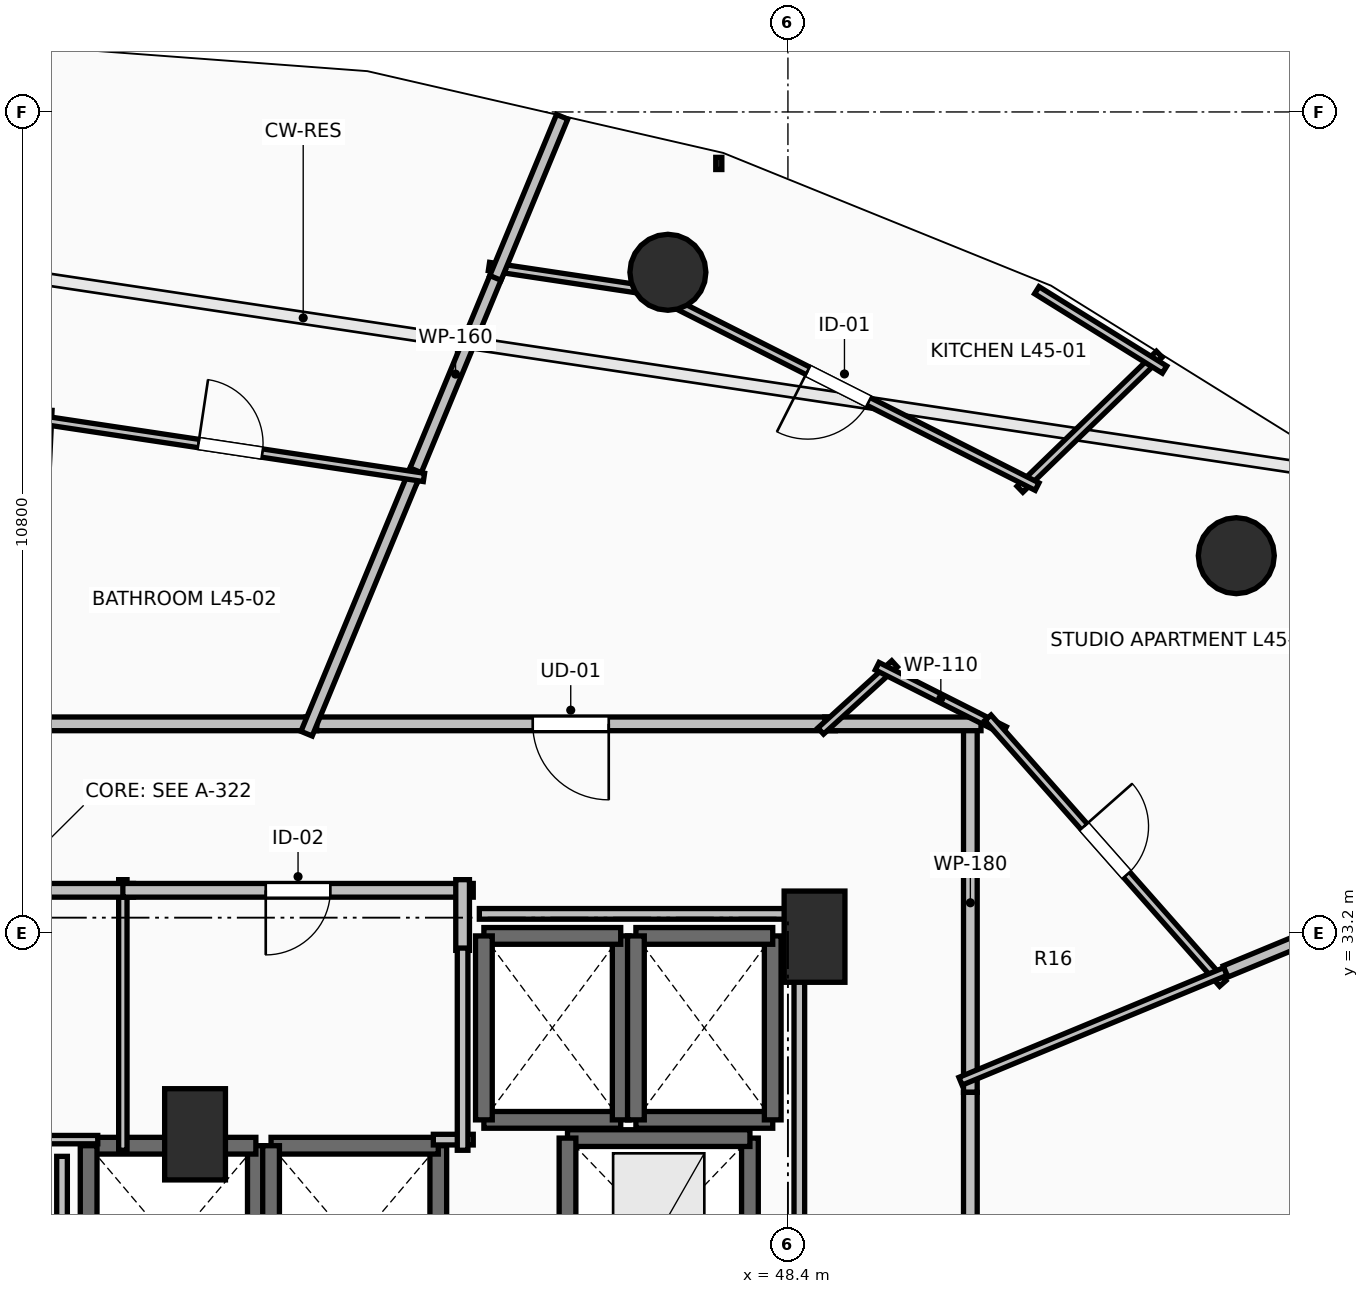
"""IFC4 building model, lengths in metres.
Left out: names, types, materials, properties, quantities, classifications, styles, units other than length and angle.
Written with IfcOpenShell. Run it as: python <this file> out.ifc"""

import sys

from ifc_helpers import new_model, si_unit, direction, frame, frame_2d, origin, origin_2d, place, context, subcontext, project, spatial, rectangle, circle, extrude, element, fill, save


model = new_model("IFC4")
c1 = context("Model", 3, precision=1e-05, world=origin(), true_north=direction((0.0, 1.0)))
c2 = subcontext(c1, "Body", "Model", "MODEL_VIEW")
j1 = project(units=[si_unit("LENGTHUNIT", "METRE"), si_unit("PLANEANGLEUNIT", "RADIAN")], contexts=[c1])
p1 = place(None, origin())
s1 = spatial("IfcSite", under=j1, at=p1, CompositionType="ELEMENT")
p2 = place(p1, origin())
s2 = spatial("IfcBuilding", under=s1, at=p2, CompositionType="ELEMENT")
p3 = place(p2, frame((0.0, 0.0, 167.6)))
s3 = spatial("IfcBuildingStorey", under=s2, at=p3, CompositionType="ELEMENT", Elevation=167.6)
for number, where, z_axis, x_axis in (
    (1, (54.299, 38.162, 0.0), (0.0, 0.0, 1.0), (0.707, 0.707, 0.0)),
    (2, (46.821, 41.891, 0.0), (0.0, 0.0, 1.0), (0.383, 0.924, 0.0)),
):
    element("IfcColumn", number, at=place(p3, frame(where, z_axis=z_axis, x_axis=x_axis)), inside=s3, PredefinedType="COLUMN", context=c2, shape_type="SweptSolid", body=[
        extrude(circle(Radius=0.5, at=origin_2d()), origin(), (0.0, 0.0, 1.0), 3.5),
    ])
for number, where, z_axis, x_axis in (
    (3, (48.75, 33.15, 0.0), (0.0, 0.0, 1.0), (1.0, 0.0, 0.0)),
    (4, (40.6, 30.55, 0.0), (0.0, 0.0, 1.0), (1.0, 0.0, 0.0)),
):
    element("IfcColumn", number, at=place(p3, frame(where, z_axis=z_axis, x_axis=x_axis)), inside=s3, PredefinedType="PILASTER", context=c2, shape_type="SweptSolid", body=[
        extrude(rectangle(XDim=0.8, YDim=1.2, at=origin_2d()), origin(), (0.0, 0.0, 1.0), 3.5),
    ])
p4 = place(p3, frame((41.4, 27.8, 0.0), z_axis=(0.0, 0.0, 1.0), x_axis=(0.0, 1.0, 0.0)))
e5 = element("IfcWall", 5, at=p4, inside=s3, PredefinedType="SOLIDWALL", context=c2, shape_type="SweptSolid", body=[
    extrude(rectangle(XDim=2.6, YDim=0.22, at=frame_2d((1.3, 0.0))), origin(), (0.0, 0.0, 1.0), 3.24),
])
p5 = place(p3, frame((41.4, 30.4, 0.0), z_axis=(0.0, 0.0, 1.0), x_axis=(-1.0, 0.0, 0.0)))
e6 = element("IfcWall", 6, at=p5, inside=s3, PredefinedType="SOLIDWALL", context=c2, shape_type="SweptSolid", body=[
    extrude(rectangle(XDim=2.2, YDim=0.22, at=frame_2d((1.1, 0.0))), origin(), (0.0, 0.0, 1.0), 3.24),
])
for number, where, z_axis, x_axis in (
    (7, (39.2, 30.4, 0.0), (0.0, 0.0, 1.0), (0.0, -1.0, 0.0)),
    (8, (43.8, 27.8, 0.0), (0.0, 0.0, 1.0), (0.0, 1.0, 0.0)),
):
    element("IfcWall", number, at=place(p3, frame(where, z_axis=z_axis, x_axis=x_axis)), inside=s3, PredefinedType="SOLIDWALL", context=c2, shape_type="SweptSolid", body=[
        extrude(rectangle(XDim=2.6, YDim=0.22, at=frame_2d((1.3, 0.0))), origin(), (0.0, 0.0, 1.0), 3.24),
    ])
p6 = place(p3, frame((43.8, 30.4, 0.0), z_axis=(0.0, 0.0, 1.0), x_axis=(-1.0, 0.0, 0.0)))
e9 = element("IfcWall", 9, at=p6, inside=s3, PredefinedType="SOLIDWALL", context=c2, shape_type="SweptSolid", body=[
    extrude(rectangle(XDim=2.2, YDim=0.22, at=frame_2d((1.1, 0.0))), origin(), (0.0, 0.0, 1.0), 3.24),
])
p7 = place(p3, frame((41.6, 30.4, 0.0), z_axis=(0.0, 0.0, 1.0), x_axis=(0.0, -1.0, 0.0)))
e10 = element("IfcWall", 10, at=p7, inside=s3, PredefinedType="SOLIDWALL", context=c2, shape_type="SweptSolid", body=[
    extrude(rectangle(XDim=2.6, YDim=0.22, at=frame_2d((1.3, 0.0))), origin(), (0.0, 0.0, 1.0), 3.24),
])
p8 = place(p3, frame((44.4, 30.74, 0.0), z_axis=(0.0, 0.0, 1.0), x_axis=(1.0, 0.0, 0.0)))
e11 = element("IfcWall", 11, at=p8, inside=s3, PredefinedType="SOLIDWALL", context=c2, shape_type="SweptSolid", body=[
    extrude(rectangle(XDim=1.8, YDim=0.22, at=frame_2d((0.9, 0.0))), origin(), (0.0, 0.0, 1.0), 3.24),
])
p9 = place(p3, frame((46.2, 30.74, 0.0), z_axis=(0.0, 0.0, 1.0), x_axis=(0.0, 1.0, 0.0)))
e12 = element("IfcWall", 12, at=p9, inside=s3, PredefinedType="SOLIDWALL", context=c2, shape_type="SweptSolid", body=[
    extrude(rectangle(XDim=2.42, YDim=0.22, at=frame_2d((1.21, 0.0))), origin(), (0.0, 0.0, 1.0), 3.24),
])
p10 = place(p3, frame((46.2, 33.16, 0.0), z_axis=(0.0, 0.0, 1.0), x_axis=(-1.0, 0.0, 0.0)))
e13 = element("IfcWall", 13, at=p10, inside=s3, PredefinedType="SOLIDWALL", context=c2, shape_type="SweptSolid", body=[
    extrude(rectangle(XDim=1.8, YDim=0.22, at=frame_2d((0.9, 0.0))), origin(), (0.0, 0.0, 1.0), 3.24),
])
p11 = place(p3, frame((44.4, 33.16, 0.0), z_axis=(0.0, 0.0, 1.0), x_axis=(0.0, -1.0, 0.0)))
e14 = element("IfcWall", 14, at=p11, inside=s3, PredefinedType="SOLIDWALL", context=c2, shape_type="SweptSolid", body=[
    extrude(rectangle(XDim=2.42, YDim=0.22, at=frame_2d((1.21, 0.0))), origin(), (0.0, 0.0, 1.0), 3.24),
])
p12 = place(p3, frame((46.4, 30.74, 0.0), z_axis=(0.0, 0.0, 1.0), x_axis=(1.0, 0.0, 0.0)))
e15 = element("IfcWall", 15, at=p12, inside=s3, PredefinedType="SOLIDWALL", context=c2, shape_type="SweptSolid", body=[
    extrude(rectangle(XDim=1.8, YDim=0.22, at=frame_2d((0.9, 0.0))), origin(), (0.0, 0.0, 1.0), 3.24),
])
p13 = place(p3, frame((48.2, 30.74, 0.0), z_axis=(0.0, 0.0, 1.0), x_axis=(0.0, 1.0, 0.0)))
e16 = element("IfcWall", 16, at=p13, inside=s3, PredefinedType="SOLIDWALL", context=c2, shape_type="SweptSolid", body=[
    extrude(rectangle(XDim=2.42, YDim=0.22, at=frame_2d((1.21, 0.0))), origin(), (0.0, 0.0, 1.0), 3.24),
])
p14 = place(p3, frame((48.2, 33.16, 0.0), z_axis=(0.0, 0.0, 1.0), x_axis=(-1.0, 0.0, 0.0)))
e17 = element("IfcWall", 17, at=p14, inside=s3, PredefinedType="SOLIDWALL", context=c2, shape_type="SweptSolid", body=[
    extrude(rectangle(XDim=1.8, YDim=0.22, at=frame_2d((0.9, 0.0))), origin(), (0.0, 0.0, 1.0), 3.24),
])
p15 = place(p3, frame((46.4, 33.16, 0.0), z_axis=(0.0, 0.0, 1.0), x_axis=(0.0, -1.0, 0.0)))
e18 = element("IfcWall", 18, at=p15, inside=s3, PredefinedType="SOLIDWALL", context=c2, shape_type="SweptSolid", body=[
    extrude(rectangle(XDim=2.42, YDim=0.22, at=frame_2d((1.21, 0.0))), origin(), (0.0, 0.0, 1.0), 3.24),
])
p16 = place(p3, frame((47.9, 28.0, 0.0), z_axis=(0.0, 0.0, 1.0), x_axis=(0.0, 1.0, 0.0)))
e19 = element("IfcWall", 19, at=p16, inside=s3, PredefinedType="SHEAR", context=c2, shape_type="SweptSolid", body=[
    extrude(rectangle(XDim=2.5, YDim=0.22, at=frame_2d((1.25, 0.0))), origin(), (0.0, 0.0, 1.0), 3.24),
])
p17 = place(p3, frame((47.9, 30.5, 0.0), z_axis=(0.0, 0.0, 1.0), x_axis=(-1.0, 0.0, 0.0)))
e20 = element("IfcWall", 20, at=p17, inside=s3, PredefinedType="SHEAR", context=c2, shape_type="SweptSolid", body=[
    extrude(rectangle(XDim=2.4, YDim=0.22, at=frame_2d((1.2, 0.0))), origin(), (0.0, 0.0, 1.0), 3.24),
])
p18 = place(p3, frame((45.5, 30.5, 0.0), z_axis=(0.0, 0.0, 1.0), x_axis=(0.0, -1.0, 0.0)))
e21 = element("IfcWall", 21, at=p18, inside=s3, PredefinedType="SHEAR", context=c2, shape_type="SweptSolid", body=[
    extrude(rectangle(XDim=2.5, YDim=0.22, at=frame_2d((1.25, 0.0))), origin(), (0.0, 0.0, 1.0), 3.24),
])
p19 = place(p3, frame((39.65, 30.34, 0.0), z_axis=(0.0, 0.0, 1.0), x_axis=(0.0, 1.0, 0.0)))
e22 = element("IfcWall", 22, at=p19, inside=s3, PredefinedType="PARTITIONING", context=c2, shape_type="SweptSolid", body=[
    extrude(rectangle(XDim=3.56, YDim=0.11, at=frame_2d((1.78, 0.0))), origin(), (0.0, 0.0, 1.0), 2.432),
])
p20 = place(p3, frame((36.16, 30.48, 0.0), z_axis=(0.0, 0.0, 1.0), x_axis=(1.0, 0.0, 0.0)))
e23 = element("IfcWall", 23, at=p20, inside=s3, PredefinedType="PARTITIONING", context=c2, shape_type="SweptSolid", body=[
    extrude(rectangle(XDim=3.16, YDim=0.11, at=frame_2d((1.58, 0.0))), origin(), (0.0, 0.0, 1.0), 2.432),
])
p21 = place(p3, frame((39.79, 33.76, 0.0), z_axis=(0.0, 0.0, 1.0), x_axis=(-1.0, 0.0, 0.0)))
e24 = element("IfcWall", 24, at=p21, inside=s3, PredefinedType="PARTITIONING", context=c2, shape_type="SweptSolid", body=[
    extrude(rectangle(XDim=3.63, YDim=0.18, at=frame_2d((1.815, 0.0))), origin(), (0.0, 0.0, 1.0), 3.24),
])
p22 = place(p21, frame((1.39, 0.0, 0.0)))
e25 = element("IfcOpeningElement", 25, at=p22, cuts=e24, PredefinedType="OPENING", context=c2, shape_type="SweptSolid", body=[
    extrude(rectangle(XDim=0.85, YDim=2.1, at=frame_2d((0.425, 1.05))), frame((0.0, 0.105, 0.0), z_axis=(0.0, -1.0, 0.0), x_axis=(1.0, 0.0, 0.0)), (0.0, 0.0, 1.0), 0.21),
])
p23 = place(p3, frame((44.26, 33.76, 0.0), z_axis=(0.0, 0.0, 1.0), x_axis=(-1.0, 0.0, 0.0)))
e26 = element("IfcWall", 26, at=p23, inside=s3, PredefinedType="PARTITIONING", context=c2, shape_type="SweptSolid", body=[
    extrude(rectangle(XDim=4.61, YDim=0.18, at=frame_2d((2.305, 0.0))), origin(), (0.0, 0.0, 1.0), 3.24),
])
p24 = place(p23, frame((1.88, 0.0, 0.0)))
e27 = element("IfcOpeningElement", 27, at=p24, cuts=e26, PredefinedType="OPENING", context=c2, shape_type="SweptSolid", body=[
    extrude(rectangle(XDim=0.85, YDim=2.1, at=frame_2d((0.425, 1.05))), frame((0.0, 0.105, 0.0), z_axis=(0.0, -1.0, 0.0), x_axis=(1.0, 0.0, 0.0)), (0.0, 0.0, 1.0), 0.21),
])
p25 = place(p3, frame((44.12, 32.97, 0.0), z_axis=(0.0, 0.0, 1.0), x_axis=(0.0, 1.0, 0.0)))
e28 = element("IfcWall", 28, at=p25, inside=s3, PredefinedType="PARTITIONING", context=c2, shape_type="SweptSolid", body=[
    extrude(rectangle(XDim=0.93, YDim=0.18, at=frame_2d((0.465, 0.0))), origin(), (0.0, 0.0, 1.0), 3.24),
])
p26 = place(p3, frame((49.024, 35.95, 0.0), z_axis=(0.0, 0.0, 1.0), x_axis=(-1.0, 0.0, 0.0)))
e29 = element("IfcWall", 29, at=p26, inside=s3, PredefinedType="PARTITIONING", context=c2, shape_type="SweptSolid", body=[
    extrude(rectangle(XDim=6.963, YDim=0.18, at=frame_2d((3.481, 0.0))), origin(), (0.0, 0.0, 1.0), 2.432),
])
p27 = place(p26, frame((2.981, 0.0, 0.0)))
e30 = element("IfcOpeningElement", 30, at=p27, cuts=e29, PredefinedType="OPENING", context=c2, shape_type="SweptSolid", body=[
    extrude(rectangle(XDim=1.0, YDim=2.15, at=frame_2d((0.5, 1.075))), frame((0.0, 0.105, 0.0), z_axis=(0.0, -1.0, 0.0), x_axis=(1.0, 0.0, 0.0)), (0.0, 0.0, 1.0), 0.21),
])
p28 = place(p3, frame((50.8, 31.102, 0.0), z_axis=(0.0, 0.0, 1.0), x_axis=(0.0, 1.0, 0.0)))
e31 = element("IfcWall", 31, at=p28, inside=s3, PredefinedType="PARTITIONING", context=c2, shape_type="SweptSolid", body=[
    extrude(rectangle(XDim=4.988, YDim=0.18, at=frame_2d((2.494, 0.0))), origin(), (0.0, 0.0, 1.0), 2.432),
])
p29 = place(p3, frame((50.94, 35.95, 0.0), z_axis=(0.0, 0.0, 1.0), x_axis=(-1.0, 0.0, 0.0)))
e32 = element("IfcWall", 32, at=p29, inside=s3, PredefinedType="PARTITIONING", context=c2, shape_type="SweptSolid", body=[
    extrude(rectangle(XDim=2.056, YDim=0.18, at=frame_2d((1.028, 0.0))), origin(), (0.0, 0.0, 1.0), 2.874),
])
p30 = place(p3, frame((42.201, 35.95, 0.0), z_axis=(0.0, 0.0, 1.0), x_axis=(-1.0, 0.0, 0.0)))
e33 = element("IfcWall", 33, at=p30, inside=s3, PredefinedType="PARTITIONING", context=c2, shape_type="SweptSolid", body=[
    extrude(rectangle(XDim=3.812, YDim=0.18, at=frame_2d((1.906, 0.0))), origin(), (0.0, 0.0, 1.0), 3.24),
])
p31 = place(p3, frame((50.8, 27.25, 0.0), z_axis=(0.0, 0.0, 1.0), x_axis=(0.0, 1.0, 0.0)))
e34 = element("IfcWall", 34, at=p31, inside=s3, PredefinedType="PARTITIONING", context=c2, shape_type="SweptSolid", body=[
    extrude(rectangle(XDim=3.852, YDim=0.18, at=frame_2d((1.926, 0.0))), origin(), (0.0, 0.0, 1.0), 2.432),
])
p32 = place(p3, frame((48.831, 35.856, 0.0), z_axis=(0.0, 0.0, 1.0), x_axis=(0.739696022243, 0.672941152463, 0.0)))
e35 = element("IfcWall", 35, at=p32, inside=s3, PredefinedType="PARTITIONING", context=c2, shape_type="SweptSolid", body=[
    extrude(rectangle(XDim=1.313, YDim=0.11, at=frame_2d((0.656, 0.0))), origin(), (0.0, 0.0, 1.0), 2.874),
])
p33 = place(p3, frame((49.574, 36.708, 0.0), z_axis=(0.0, 0.0, 1.0), x_axis=(0.8925722309, -0.450904438464, 0.0)))
e36 = element("IfcWall", 36, at=p33, inside=s3, PredefinedType="PARTITIONING", context=c2, shape_type="SweptSolid", body=[
    extrude(rectangle(XDim=1.877, YDim=0.11, at=frame_2d((0.938, 0.0))), origin(), (0.0, 0.0, 1.0), 3.24),
])
p34 = place(p3, frame((51.031, 36.03, 0.0), z_axis=(0.0, 0.0, 1.0), x_axis=(0.662223763999, -0.749306136632, 0.0)))
e37 = element("IfcWall", 37, at=p34, inside=s3, PredefinedType="PARTITIONING", context=c2, shape_type="SweptSolid", body=[
    extrude(rectangle(XDim=4.665, YDim=0.11, at=frame_2d((2.333, 0.0))), origin(), (0.0, 0.0, 1.0), 2.432),
])
p35 = place(p34, frame((1.908, 0.0, 0.0)))
e38 = element("IfcOpeningElement", 38, at=p35, cuts=e37, PredefinedType="OPENING", context=c2, shape_type="SweptSolid", body=[
    extrude(rectangle(XDim=0.85, YDim=2.1, at=frame_2d((0.425, 1.05))), frame((0.0, 0.07, 0.0), z_axis=(0.0, -1.0, 0.0), x_axis=(1.0, 0.0, 0.0)), (0.0, 0.0, 1.0), 0.14),
])
p36 = place(p3, frame((54.157, 32.693, 0.0), z_axis=(0.0, 0.0, 1.0), x_axis=(-0.923865440054, -0.382717452795, 0.0)))
e39 = element("IfcWall", 39, at=p36, inside=s3, PredefinedType="PARTITIONING", context=c2, shape_type="SweptSolid", body=[
    extrude(rectangle(XDim=3.774, YDim=0.11, at=frame_2d((1.887, 0.0))), origin(), (0.0, 0.0, 1.0), 2.432),
])
p37 = place(p3, frame((53.286, 40.812, 0.0), z_axis=(0.0, 0.0, 1.0), x_axis=(-0.718256654627, -0.69577825353, 0.0)))
e40 = element("IfcWall", 40, at=p37, inside=s3, PredefinedType="PARTITIONING", context=c2, shape_type="SweptSolid", body=[
    extrude(rectangle(XDim=2.552, YDim=0.11, at=frame_2d((1.276, 0.0))), origin(), (0.0, 0.0, 1.0), 2.728),
])
p38 = place(p3, frame((51.678, 39.071, 0.0), z_axis=(0.0, 0.0, 1.0), x_axis=(-0.892519613246, 0.451008580818, 0.0)))
e41 = element("IfcWall", 41, at=p38, inside=s3, PredefinedType="PARTITIONING", context=c2, shape_type="SweptSolid", body=[
    extrude(rectangle(XDim=5.861, YDim=0.11, at=frame_2d((2.93, 0.0))), origin(), (0.0, 0.0, 1.0), 2.432),
])
p39 = place(p38, frame((2.48, 0.0, 0.0)))
e42 = element("IfcOpeningElement", 42, at=p39, cuts=e41, PredefinedType="OPENING", context=c2, shape_type="SweptSolid", body=[
    extrude(rectangle(XDim=0.9, YDim=2.1, at=frame_2d((0.45, 1.05))), frame((0.0, 0.07, 0.0), z_axis=(0.0, -1.0, 0.0), x_axis=(1.0, 0.0, 0.0)), (0.0, 0.0, 1.0), 0.14),
])
p40 = place(p3, frame((46.71, 41.63, 0.0), z_axis=(0.0, 0.0, 1.0), x_axis=(-0.988930827604, 0.14837728335, 0.0)))
e43 = element("IfcWall", 43, at=p40, inside=s3, PredefinedType="PARTITIONING", context=c2, shape_type="SweptSolid", body=[
    extrude(rectangle(XDim=2.269, YDim=0.11, at=frame_2d((1.135, 0.0))), origin(), (0.0, 0.0, 1.0), 3.24),
])
p41 = place(p3, frame((53.355, 40.61, 0.0), z_axis=(0.0, 0.0, 1.0), x_axis=(-0.8493331579, 0.527857165237, 0.0)))
e44 = element("IfcWall", 44, at=p41, inside=s3, PredefinedType="PARTITIONING", context=c2, shape_type="SweptSolid", body=[
    extrude(rectangle(XDim=1.979, YDim=0.11, at=frame_2d((0.99, 0.0))), origin(), (0.0, 0.0, 1.0), 3.24),
])
p42 = place(p3, frame((44.605, 41.946, 0.0), z_axis=(0.0, 0.0, 1.0), x_axis=(-0.382777783416, -0.923840445382, 0.0)))
e45 = element("IfcWall", 45, at=p42, inside=s3, PredefinedType="PARTITIONING", context=c2, shape_type="SweptSolid", body=[
    extrude(rectangle(XDim=3.02, YDim=0.16, at=frame_2d((1.51, 0.0))), origin(), (0.0, 0.0, 1.0), 2.929),
])
p43 = place(p3, frame((43.503, 39.285, 0.0), z_axis=(0.0, 0.0, 1.0), x_axis=(-0.382867331148, -0.923803337697, 0.0)))
e46 = element("IfcWall", 46, at=p43, inside=s3, PredefinedType="PARTITIONING", context=c2, shape_type="SweptSolid", body=[
    extrude(rectangle(XDim=3.75, YDim=0.16, at=frame_2d((1.875, 0.0))), origin(), (0.0, 0.0, 1.0), 2.874),
])
p44 = place(p3, frame((54.157, 32.692, 0.0), z_axis=(0.0, 0.0, 1.0), x_axis=(0.923898107484, 0.382638585335, 0.0)))
e47 = element("IfcWall", 47, at=p44, inside=s3, PredefinedType="PARTITIONING", context=c2, shape_type="SweptSolid", body=[
    extrude(rectangle(XDim=5.939, YDim=0.16, at=frame_2d((2.97, 0.0))), origin(), (0.0, 0.0, 1.0), 2.432),
])
p45 = place(p3, frame((45.43, 43.936, 0.0), z_axis=(0.0, 0.0, 1.0), x_axis=(-0.382755897173, -0.923849513276, 0.0)))
e48 = element("IfcWall", 48, at=p45, inside=s3, PredefinedType="PARTITIONING", context=c2, shape_type="SweptSolid", body=[
    extrude(rectangle(XDim=2.294, YDim=0.16, at=frame_2d((1.147, 0.0))), origin(), (0.0, 0.0, 1.0), 2.728),
])
p46 = place(p3, frame((38.519, 39.958, 0.0), z_axis=(0.0, 0.0, 1.0), x_axis=(0.988887618714, -0.14866498429, 0.0)))
e49 = element("IfcWall", 49, at=p46, inside=s3, PredefinedType="PARTITIONING", context=c2, shape_type="SweptSolid", body=[
    extrude(rectangle(XDim=5.15, YDim=0.11, at=frame_2d((2.575, 0.0))), origin(), (0.0, 0.0, 1.0), 2.929),
])
p47 = place(p46, frame((2.15, 0.0, 0.0)))
e50 = element("IfcOpeningElement", 50, at=p47, cuts=e49, PredefinedType="OPENING", context=c2, shape_type="SweptSolid", body=[
    extrude(rectangle(XDim=0.85, YDim=2.1, at=frame_2d((0.425, 1.05))), frame((0.0, 0.07, 0.0), z_axis=(0.0, -1.0, 0.0), x_axis=(1.0, 0.0, 0.0)), (0.0, 0.0, 1.0), 0.14),
])
p48 = place(p3, frame((43.735, 30.48, 0.0), z_axis=(0.0, 0.0, 1.0), x_axis=(1.0, 0.0, 0.0)))
e51 = element("IfcWall", 51, at=p48, inside=s3, PredefinedType="PARTITIONING", context=c2, shape_type="SweptSolid", body=[
    extrude(rectangle(XDim=0.525, YDim=0.14, at=frame_2d((0.262, 0.0))), origin(), (0.0, 0.0, 1.0), 3.24),
])
p49 = place(p3, frame((44.12, 30.34, 0.0), z_axis=(0.0, 0.0, 1.0), x_axis=(0.0, 1.0, 0.0)))
e52 = element("IfcWall", 52, at=p49, inside=s3, PredefinedType="PARTITIONING", context=c2, shape_type="SweptSolid", body=[
    extrude(rectangle(XDim=2.66, YDim=0.14, at=frame_2d((1.33, 0.0))), origin(), (0.0, 0.0, 1.0), 3.24),
])
p50 = place(p3, frame((38.85, 27.87, 0.0), z_axis=(0.0, 0.0, 1.0), x_axis=(0.0, 1.0, 0.0)))
e53 = element("IfcWall", 53, at=p50, inside=s3, PredefinedType="PARTITIONING", context=c2, shape_type="SweptSolid", body=[
    extrude(rectangle(XDim=2.39, YDim=0.14, at=frame_2d((1.195, 0.0))), origin(), (0.0, 0.0, 1.0), 3.24),
])
p51 = place(p3, frame((48.55, 28.196, 0.0), z_axis=(0.0, 0.0, 1.0), x_axis=(0.0, 1.0, 0.0)))
e54 = element("IfcWall", 54, at=p51, inside=s3, PredefinedType="PARTITIONING", context=c2, shape_type="SweptSolid", body=[
    extrude(rectangle(XDim=5.254, YDim=0.14, at=frame_2d((2.627, 0.0))), origin(), (0.0, 0.0, 1.0), 2.432),
])
p52 = place(p3, frame((48.55, 33.45, 0.0), z_axis=(0.0, 0.0, 1.0), x_axis=(-1.0, 0.0, 0.0)))
e55 = element("IfcWall", 55, at=p52, inside=s3, PredefinedType="PARTITIONING", context=c2, shape_type="SweptSolid", body=[
    extrude(rectangle(XDim=4.21, YDim=0.14, at=frame_2d((2.105, 0.0))), origin(), (0.0, 0.0, 1.0), 2.432),
])
p53 = place(p24, origin())
e56 = element("IfcDoor", 56, at=p53, inside=s3, OperationType="SINGLE_SWING_RIGHT", PredefinedType="DOOR", context=c2, shape_type="SweptSolid", body=[
    extrude(rectangle(XDim=0.85, YDim=2.1, at=frame_2d((0.425, 1.05))), frame((0.0, 0.025, 0.0), z_axis=(0.0, -1.0, 0.0), x_axis=(1.0, 0.0, 0.0)), (0.0, 0.0, 1.0), 0.05),
])
fill(e27, e56)
p54 = place(p27, origin())
e57 = element("IfcDoor", 57, at=p54, inside=s3, OperationType="SINGLE_SWING_LEFT", PredefinedType="DOOR", context=c2, shape_type="SweptSolid", body=[
    extrude(rectangle(XDim=1.0, YDim=2.15, at=frame_2d((0.5, 1.075))), frame((0.0, 0.025, 0.0), z_axis=(0.0, -1.0, 0.0), x_axis=(1.0, 0.0, 0.0)), (0.0, 0.0, 1.0), 0.05),
])
fill(e30, e57)
p55 = place(p35, origin())
e58 = element("IfcDoor", 58, at=p55, inside=s3, OperationType="SINGLE_SWING_LEFT", PredefinedType="DOOR", context=c2, shape_type="SweptSolid", body=[
    extrude(rectangle(XDim=0.85, YDim=2.1, at=frame_2d((0.425, 1.05))), frame((0.0, 0.025, 0.0), z_axis=(0.0, -1.0, 0.0), x_axis=(1.0, 0.0, 0.0)), (0.0, 0.0, 1.0), 0.05),
])
fill(e38, e58)
p56 = place(p39, origin())
e59 = element("IfcDoor", 59, at=p56, inside=s3, OperationType="SINGLE_SWING_RIGHT", PredefinedType="DOOR", context=c2, shape_type="SweptSolid", body=[
    extrude(rectangle(XDim=0.9, YDim=2.1, at=frame_2d((0.45, 1.05))), frame((0.0, 0.025, 0.0), z_axis=(0.0, -1.0, 0.0), x_axis=(1.0, 0.0, 0.0)), (0.0, 0.0, 1.0), 0.05),
])
fill(e42, e59)
p57 = place(p47, origin())
e60 = element("IfcDoor", 60, at=p57, inside=s3, OperationType="SINGLE_SWING_LEFT", PredefinedType="DOOR", context=c2, shape_type="SweptSolid", body=[
    extrude(rectangle(XDim=0.85, YDim=2.1, at=frame_2d((0.425, 1.05))), frame((0.0, 0.025, 0.0), z_axis=(0.0, -1.0, 0.0), x_axis=(1.0, 0.0, 0.0)), (0.0, 0.0, 1.0), 0.05),
])
fill(e50, e60)
save(model, sys.argv[1])
